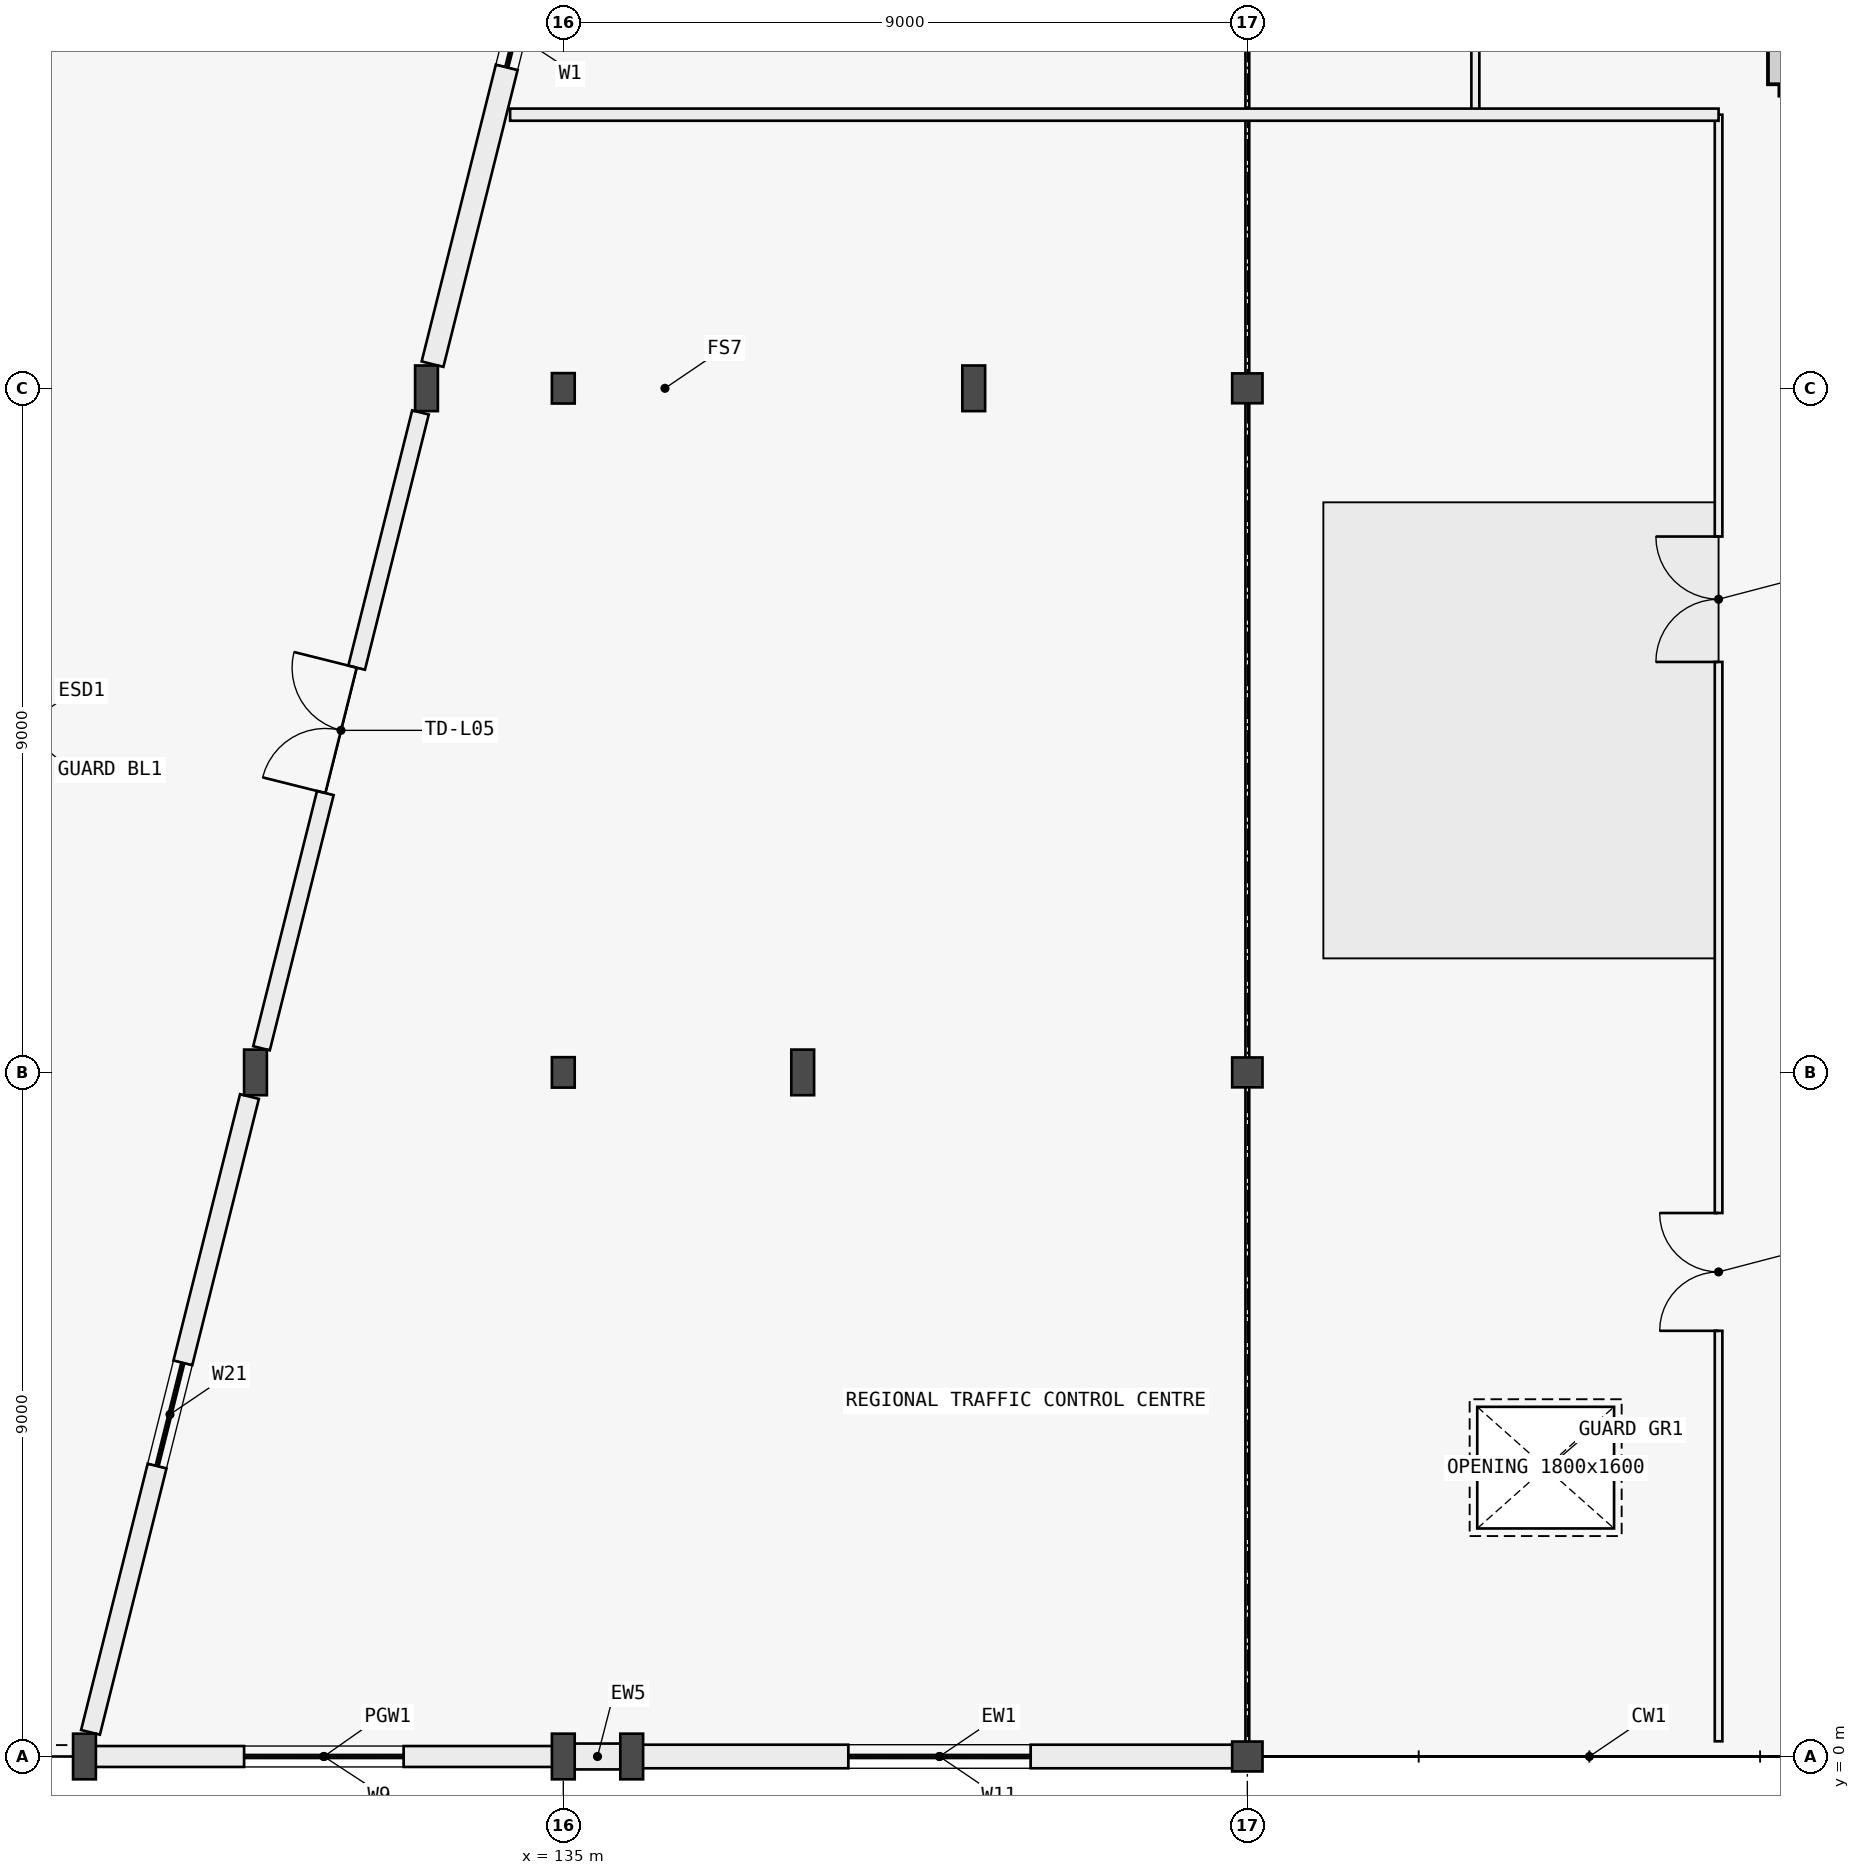
"""IFC4 building model, lengths in metres.
Left out: names, types, materials, properties, quantities, classifications, styles, units other than length and angle.
Written with IfcOpenShell. Run it as: python <this file> out.ifc"""

import sys

from ifc_helpers import new_model, si_unit, direction, frame, frame_2d, origin, origin_2d, place, context, subcontext, project, spatial, rectangle, i_section, extrude, element, fill, save


model = new_model("IFC4")
c1 = context("Model", 3, precision=1e-05, world=origin(), true_north=direction((0.0, 1.0)))
c2 = subcontext(c1, "Body", "Model", "MODEL_VIEW")
j1 = project(units=[si_unit("LENGTHUNIT", "METRE"), si_unit("PLANEANGLEUNIT", "RADIAN")], contexts=[c1])
p1 = place(None, origin())
s1 = spatial("IfcSite", under=j1, at=p1, CompositionType="ELEMENT")
p2 = place(p1, origin())
s2 = spatial("IfcBuilding", under=s1, at=p2, CompositionType="ELEMENT")
p3 = place(p2, frame((0.0, 0.0, 21.0)))
s3 = spatial("IfcBuildingStorey", under=s2, at=p3, CompositionType="ELEMENT", Elevation=21.0)
for number, where, z_axis, x_axis in (
    (1, (128.7, 0.0, 0.0), (0.0, 0.0, 1.0), (1.0, 0.0, 0.0)),
    (2, (135.0, 0.0, 0.0), (0.0, 0.0, 1.0), (1.0, 0.0, 0.0)),
    (3, (135.9, 0.0, 0.0), (0.0, 0.0, 1.0), (1.0, 0.0, 0.0)),
):
    element("IfcColumn", number, at=place(p3, frame(where, z_axis=z_axis, x_axis=x_axis)), inside=s3, PredefinedType="COLUMN", context=c2, shape_type="SweptSolid", body=[
        extrude(i_section(OverallWidth=0.3, OverallDepth=0.6, WebThickness=0.015, FlangeThickness=0.03, FilletRadius=0.027, at=origin_2d()), origin(), (0.0, 0.0, 1.0), 4.2),
    ])
p4 = place(p3, frame((144.0, 0.0, 0.0), z_axis=(0.0, 0.0, 1.0), x_axis=(1.0, 0.0, 0.0)))
e4 = element("IfcColumn", 4, at=p4, inside=s3, PredefinedType="COLUMN", context=c2, shape_type="SweptSolid", body=[
    extrude(i_section(OverallWidth=0.399, OverallDepth=0.393, WebThickness=0.018, FlangeThickness=0.028, FilletRadius=0.015, at=origin_2d()), origin(), (0.0, 0.0, 1.0), 4.2),
])
p5 = place(p3, frame((130.95, 9.0, 0.0), z_axis=(0.0, 0.0, 1.0), x_axis=(1.0, 0.0, 0.0)))
e5 = element("IfcColumn", 5, at=p5, inside=s3, PredefinedType="COLUMN", context=c2, shape_type="SweptSolid", body=[
    extrude(i_section(OverallWidth=0.3, OverallDepth=0.6, WebThickness=0.015, FlangeThickness=0.03, FilletRadius=0.027, at=origin_2d()), origin(), (0.0, 0.0, 1.0), 4.2),
])
p6 = place(p3, frame((135.0, 9.0, 0.0), z_axis=(0.0, 0.0, 1.0), x_axis=(1.0, 0.0, 0.0)))
e6 = element("IfcColumn", 6, at=p6, inside=s3, PredefinedType="COLUMN", context=c2, shape_type="SweptSolid", body=[
    extrude(i_section(OverallWidth=0.3, OverallDepth=0.4, WebThickness=0.013, FlangeThickness=0.024, FilletRadius=0.027, at=origin_2d()), origin(), (0.0, 0.0, 1.0), 4.2),
])
p7 = place(p3, frame((138.15, 9.0, 0.0), z_axis=(0.0, 0.0, 1.0), x_axis=(1.0, 0.0, 0.0)))
e7 = element("IfcColumn", 7, at=p7, inside=s3, PredefinedType="COLUMN", context=c2, shape_type="SweptSolid", body=[
    extrude(i_section(OverallWidth=0.3, OverallDepth=0.6, WebThickness=0.015, FlangeThickness=0.03, FilletRadius=0.027, at=origin_2d()), origin(), (0.0, 0.0, 1.0), 4.2),
])
p8 = place(p3, frame((144.0, 9.0, 0.0), z_axis=(0.0, 0.0, 1.0), x_axis=(1.0, 0.0, 0.0)))
e8 = element("IfcColumn", 8, at=p8, inside=s3, PredefinedType="COLUMN", context=c2, shape_type="SweptSolid", body=[
    extrude(i_section(OverallWidth=0.399, OverallDepth=0.393, WebThickness=0.018, FlangeThickness=0.028, FilletRadius=0.015, at=origin_2d()), origin(), (0.0, 0.0, 1.0), 4.2),
])
p9 = place(p3, frame((133.2, 18.0, 0.0), z_axis=(0.0, 0.0, 1.0), x_axis=(1.0, 0.0, 0.0)))
e9 = element("IfcColumn", 9, at=p9, inside=s3, PredefinedType="COLUMN", context=c2, shape_type="SweptSolid", body=[
    extrude(i_section(OverallWidth=0.3, OverallDepth=0.6, WebThickness=0.015, FlangeThickness=0.03, FilletRadius=0.027, at=origin_2d()), origin(), (0.0, 0.0, 1.0), 4.2),
])
p10 = place(p3, frame((135.0, 18.0, 0.0), z_axis=(0.0, 0.0, 1.0), x_axis=(1.0, 0.0, 0.0)))
e10 = element("IfcColumn", 10, at=p10, inside=s3, PredefinedType="COLUMN", context=c2, shape_type="SweptSolid", body=[
    extrude(i_section(OverallWidth=0.3, OverallDepth=0.4, WebThickness=0.013, FlangeThickness=0.024, FilletRadius=0.027, at=origin_2d()), origin(), (0.0, 0.0, 1.0), 4.2),
])
p11 = place(p3, frame((140.4, 18.0, 0.0), z_axis=(0.0, 0.0, 1.0), x_axis=(1.0, 0.0, 0.0)))
e11 = element("IfcColumn", 11, at=p11, inside=s3, PredefinedType="COLUMN", context=c2, shape_type="SweptSolid", body=[
    extrude(i_section(OverallWidth=0.3, OverallDepth=0.6, WebThickness=0.015, FlangeThickness=0.03, FilletRadius=0.027, at=origin_2d()), origin(), (0.0, 0.0, 1.0), 4.2),
])
p12 = place(p3, frame((144.0, 18.0, 0.0), z_axis=(0.0, 0.0, 1.0), x_axis=(1.0, 0.0, 0.0)))
e12 = element("IfcColumn", 12, at=p12, inside=s3, PredefinedType="COLUMN", context=c2, shape_type="SweptSolid", body=[
    extrude(i_section(OverallWidth=0.399, OverallDepth=0.393, WebThickness=0.018, FlangeThickness=0.028, FilletRadius=0.015, at=origin_2d()), origin(), (0.0, 0.0, 1.0), 4.2),
])
p13 = place(p3, frame((128.708, 0.0, 0.0), z_axis=(0.0, 0.0, 1.0), x_axis=(1.0, 0.0, 0.0)))
e13 = element("IfcWall", 13, at=p13, inside=s3, PredefinedType="POLYGONAL", context=c2, shape_type="SweptSolid", body=[
    extrude(rectangle(XDim=6.284, YDim=0.275, at=frame_2d((3.142, 0.0))), origin(), (0.0, 0.0, 1.0), 3.665),
])
p14 = place(p13, frame((2.092, 0.0, 0.95)))
e14 = element("IfcOpeningElement", 14, at=p14, cuts=e13, PredefinedType="OPENING", context=c2, shape_type="SweptSolid", body=[
    extrude(rectangle(XDim=2.1, YDim=1.7, at=frame_2d((1.05, 0.85))), frame((0.0, 0.147, 0.0), z_axis=(0.0, -1.0, 0.0), x_axis=(1.0, 0.0, 0.0)), (0.0, 0.0, 1.0), 0.295),
])
p15 = place(p3, frame((135.008, 0.0, 0.0), z_axis=(0.0, 0.0, 1.0), x_axis=(1.0, 0.0, 0.0)))
e15 = element("IfcWall", 15, at=p15, inside=s3, PredefinedType="STANDARD", context=c2, shape_type="SweptSolid", body=[
    extrude(rectangle(XDim=0.885, YDim=0.34, at=frame_2d((0.442, 0.0))), origin(), (0.0, 0.0, 1.0), 3.665),
])
p16 = place(p3, frame((135.908, 0.0, 0.0), z_axis=(0.0, 0.0, 1.0), x_axis=(1.0, 0.0, 0.0)))
e16 = element("IfcWall", 16, at=p16, inside=s3, PredefinedType="STANDARD", context=c2, shape_type="SweptSolid", body=[
    extrude(rectangle(XDim=8.083, YDim=0.31, at=frame_2d((4.042, 0.0))), origin(), (0.0, 0.0, 1.0), 3.635),
])
p17 = place(p16, frame((2.842, 0.0, 0.95)))
e17 = element("IfcOpeningElement", 17, at=p17, cuts=e16, PredefinedType="OPENING", context=c2, shape_type="SweptSolid", body=[
    extrude(rectangle(XDim=2.4, YDim=1.8, at=frame_2d((1.2, 0.9))), frame((0.0, 0.165, 0.0), z_axis=(0.0, -1.0, 0.0), x_axis=(1.0, 0.0, 0.0)), (0.0, 0.0, 1.0), 0.33),
])
p18 = place(p3, frame((128.779, 0.318, 0.0), z_axis=(0.0, 0.0, 1.0), x_axis=(0.242548949865, 0.970139168841, 0.0)))
e18 = element("IfcWall", 18, at=p18, inside=s3, PredefinedType="POLYGONAL", context=c2, shape_type="SweptSolid", body=[
    extrude(rectangle(XDim=8.622, YDim=0.255, at=frame_2d((4.311, 0.0))), origin(), (0.0, 0.0, 1.0), 3.96),
])
p19 = place(p18, frame((3.611, 0.0, 0.95)))
e19 = element("IfcOpeningElement", 19, at=p19, cuts=e18, PredefinedType="OPENING", context=c2, shape_type="SweptSolid", body=[
    extrude(rectangle(XDim=1.4, YDim=2.0, at=frame_2d((0.7, 1.0))), frame((0.0, 0.137, 0.0), z_axis=(0.0, -1.0, 0.0), x_axis=(1.0, 0.0, 0.0)), (0.0, 0.0, 1.0), 0.275),
])
p20 = place(p3, frame((131.029, 9.318, 0.0), z_axis=(0.0, 0.0, 1.0), x_axis=(0.242548949865, 0.970139168841, 0.0)))
e20 = element("IfcWall", 20, at=p20, inside=s3, PredefinedType="STANDARD", context=c2, shape_type="SweptSolid", body=[
    extrude(rectangle(XDim=8.622, YDim=0.225, at=frame_2d((4.311, 0.0))), origin(), (0.0, 0.0, 1.0), 3.96),
])
p21 = place(p20, frame((3.461, 0.0, 0.0)))
e21 = element("IfcOpeningElement", 21, at=p21, cuts=e20, PredefinedType="OPENING", context=c2, shape_type="SweptSolid", body=[
    extrude(rectangle(XDim=1.7, YDim=2.2, at=frame_2d((0.85, 1.1))), frame((0.0, 0.123, 0.0), z_axis=(0.0, -1.0, 0.0), x_axis=(1.0, 0.0, 0.0)), (0.0, 0.0, 1.0), 0.245),
])
p22 = place(p3, frame((133.279, 18.318, 0.0), z_axis=(0.0, 0.0, 1.0), x_axis=(0.242542043737, 0.970140895448, 0.0)))
e22 = element("IfcWall", 22, at=p22, inside=s3, PredefinedType="STANDARD", context=c2, shape_type="SweptSolid", body=[
    extrude(rectangle(XDim=8.95, YDim=0.295, at=frame_2d((4.475, 0.0))), origin(), (0.0, 0.0, 1.0), 3.485),
])
p23 = place(p22, frame((4.025, 0.0, 0.95)))
e23 = element("IfcOpeningElement", 23, at=p23, cuts=e22, PredefinedType="OPENING", context=c2, shape_type="SweptSolid", body=[
    extrude(rectangle(XDim=0.9, YDim=1.2, at=frame_2d((0.45, 0.6))), frame((0.0, 0.157, 0.0), z_axis=(0.0, -1.0, 0.0), x_axis=(1.0, 0.0, 0.0)), (0.0, 0.0, 1.0), 0.315),
])
p24 = place(p3, frame((151.0, 22.0, 0.0), z_axis=(0.0, 0.0, 1.0), x_axis=(1.0, 0.0, 0.0)))
e24 = element("IfcWall", 24, at=p24, inside=s3, PredefinedType="SHEAR", context=c2, shape_type="SweptSolid", body=[
    extrude(rectangle(XDim=10.2, YDim=0.3, at=frame_2d((5.1, 0.0))), origin(), (0.0, 0.0, 1.0), 3.96),
])
p25 = place(p24, frame((4.75, 0.0, 0.0)))
e25 = element("IfcOpeningElement", 25, at=p25, cuts=e24, PredefinedType="OPENING", context=c2, shape_type="SweptSolid", body=[
    extrude(rectangle(XDim=1.2, YDim=2.15, at=frame_2d((0.6, 1.075))), frame((0.0, 0.16, 0.0), z_axis=(0.0, -1.0, 0.0), x_axis=(1.0, 0.0, 0.0)), (0.0, 0.0, 1.0), 0.32),
])
p26 = place(p3, frame((151.0, 30.2, 0.0), z_axis=(0.0, 0.0, 1.0), x_axis=(0.0, -1.0, 0.0)))
e26 = element("IfcWall", 26, at=p26, inside=s3, PredefinedType="SHEAR", context=c2, shape_type="SweptSolid", body=[
    extrude(rectangle(XDim=8.2, YDim=0.3, at=frame_2d((4.1, 0.0))), origin(), (0.0, 0.0, 1.0), 3.96),
])
p27 = place(p3, frame((150.2, 0.2, 0.0), z_axis=(0.0, 0.0, 1.0), x_axis=(0.0, 1.0, 0.0)))
e27 = element("IfcWall", 27, at=p27, inside=s3, PredefinedType="PARTITIONING", context=c2, shape_type="SweptSolid", body=[
    extrude(rectangle(XDim=21.4, YDim=0.1, at=frame_2d((10.7, 0.0))), origin(), (0.0, 0.0, 1.0), 3.665),
])
p28 = place(p27, frame((5.4, 0.0, 0.0)))
e28 = element("IfcOpeningElement", 28, at=p28, cuts=e27, PredefinedType="OPENING", context=c2, shape_type="SweptSolid", body=[
    extrude(rectangle(XDim=1.55, YDim=2.22, at=frame_2d((0.775, 1.11))), frame((0.0, 0.06, 0.0), z_axis=(0.0, -1.0, 0.0), x_axis=(1.0, 0.0, 0.0)), (0.0, 0.0, 1.0), 0.12),
])
p29 = place(p27, frame((14.2, 0.0, 0.0)))
e29 = element("IfcOpeningElement", 29, at=p29, cuts=e27, PredefinedType="OPENING", context=c2, shape_type="SweptSolid", body=[
    extrude(rectangle(XDim=1.65, YDim=2.25, at=frame_2d((0.825, 1.125))), frame((0.0, 0.06, 0.0), z_axis=(0.0, -1.0, 0.0), x_axis=(1.0, 0.0, 0.0)), (0.0, 0.0, 1.0), 0.12),
])
p30 = place(p3, frame((147.0, 21.6, 0.0), z_axis=(0.0, 0.0, 1.0), x_axis=(0.0, 1.0, 0.0)))
e30 = element("IfcWall", 30, at=p30, inside=s3, PredefinedType="MOVABLE", context=c2, shape_type="SweptSolid", body=[
    extrude(rectangle(XDim=14.6, YDim=0.105, at=frame_2d((7.3, 0.0))), origin(), (0.0, 0.0, 1.0), 3.96),
])
p31 = place(p30, frame((6.5, 0.0, 0.0)))
e31 = element("IfcOpeningElement", 31, at=p31, cuts=e30, PredefinedType="OPENING", context=c2, shape_type="SweptSolid", body=[
    extrude(rectangle(XDim=0.9, YDim=2.1, at=frame_2d((0.45, 1.05))), frame((0.0, 0.062, 0.0), z_axis=(0.0, -1.0, 0.0), x_axis=(1.0, 0.0, 0.0)), (0.0, 0.0, 1.0), 0.125),
])
p32 = place(p3, frame((134.3, 21.6, 0.0), z_axis=(0.0, 0.0, 1.0), x_axis=(1.0, 0.0, 0.0)))
e32 = element("IfcWall", 32, at=p32, inside=s3, PredefinedType="PARTITIONING", context=c2, shape_type="SweptSolid", body=[
    extrude(rectangle(XDim=15.9, YDim=0.16, at=frame_2d((7.95, 0.0))), origin(), (0.0, 0.0, 1.0), 3.96),
])
p33 = place(p14, origin())
e33 = element("IfcWindow", 33, at=p33, inside=s3, PartitioningType="SINGLE_PANEL", PredefinedType="WINDOW", context=c2, shape_type="SweptSolid", body=[
    extrude(rectangle(XDim=2.1, YDim=1.7, at=frame_2d((1.05, 0.85))), frame((0.0, 0.03, 0.0), z_axis=(0.0, -1.0, 0.0), x_axis=(1.0, 0.0, 0.0)), (0.0, 0.0, 1.0), 0.06),
])
fill(e14, e33)
p34 = place(p17, origin())
e34 = element("IfcWindow", 34, at=p34, inside=s3, PartitioningType="SINGLE_PANEL", PredefinedType="WINDOW", context=c2, shape_type="SweptSolid", body=[
    extrude(rectangle(XDim=2.4, YDim=1.8, at=frame_2d((1.2, 0.9))), frame((0.0, 0.03, 0.0), z_axis=(0.0, -1.0, 0.0), x_axis=(1.0, 0.0, 0.0)), (0.0, 0.0, 1.0), 0.06),
])
fill(e17, e34)
p35 = place(p19, origin())
e35 = element("IfcWindow", 35, at=p35, inside=s3, PartitioningType="SINGLE_PANEL", PredefinedType="WINDOW", context=c2, shape_type="SweptSolid", body=[
    extrude(rectangle(XDim=1.4, YDim=2.0, at=frame_2d((0.7, 1.0))), frame((0.0, 0.03, 0.0), z_axis=(0.0, -1.0, 0.0), x_axis=(1.0, 0.0, 0.0)), (0.0, 0.0, 1.0), 0.06),
])
fill(e19, e35)
p36 = place(p21, origin())
e36 = element("IfcDoor", 36, at=p36, inside=s3, OperationType="DOUBLE_DOOR_SINGLE_SWING", PredefinedType="DOOR", context=c2, shape_type="SweptSolid", body=[
    extrude(rectangle(XDim=1.7, YDim=2.2, at=frame_2d((0.85, 1.1))), frame((0.0, 0.025, 0.0), z_axis=(0.0, -1.0, 0.0), x_axis=(1.0, 0.0, 0.0)), (0.0, 0.0, 1.0), 0.05),
])
fill(e21, e36)
p37 = place(p23, origin())
e37 = element("IfcWindow", 37, at=p37, inside=s3, PartitioningType="SINGLE_PANEL", PredefinedType="WINDOW", context=c2, shape_type="SweptSolid", body=[
    extrude(rectangle(XDim=0.9, YDim=1.2, at=frame_2d((0.45, 0.6))), frame((0.0, 0.03, 0.0), z_axis=(0.0, -1.0, 0.0), x_axis=(1.0, 0.0, 0.0)), (0.0, 0.0, 1.0), 0.06),
])
fill(e23, e37)
p38 = place(p28, origin())
e38 = element("IfcDoor", 38, at=p38, inside=s3, OperationType="DOUBLE_DOOR_SINGLE_SWING", PredefinedType="DOOR", context=c2, shape_type="SweptSolid", body=[
    extrude(rectangle(XDim=1.55, YDim=2.22, at=frame_2d((0.775, 1.11))), frame((0.0, 0.025, 0.0), z_axis=(0.0, -1.0, 0.0), x_axis=(1.0, 0.0, 0.0)), (0.0, 0.0, 1.0), 0.05),
])
fill(e28, e38)
p39 = place(p29, origin())
e39 = element("IfcDoor", 39, at=p39, inside=s3, OperationType="DOUBLE_DOOR_SINGLE_SWING", PredefinedType="DOOR", context=c2, shape_type="SweptSolid", body=[
    extrude(rectangle(XDim=1.65, YDim=2.25, at=frame_2d((0.825, 1.125))), frame((0.0, 0.025, 0.0), z_axis=(0.0, -1.0, 0.0), x_axis=(1.0, 0.0, 0.0)), (0.0, 0.0, 1.0), 0.05),
])
fill(e29, e39)
save(model, sys.argv[1])
